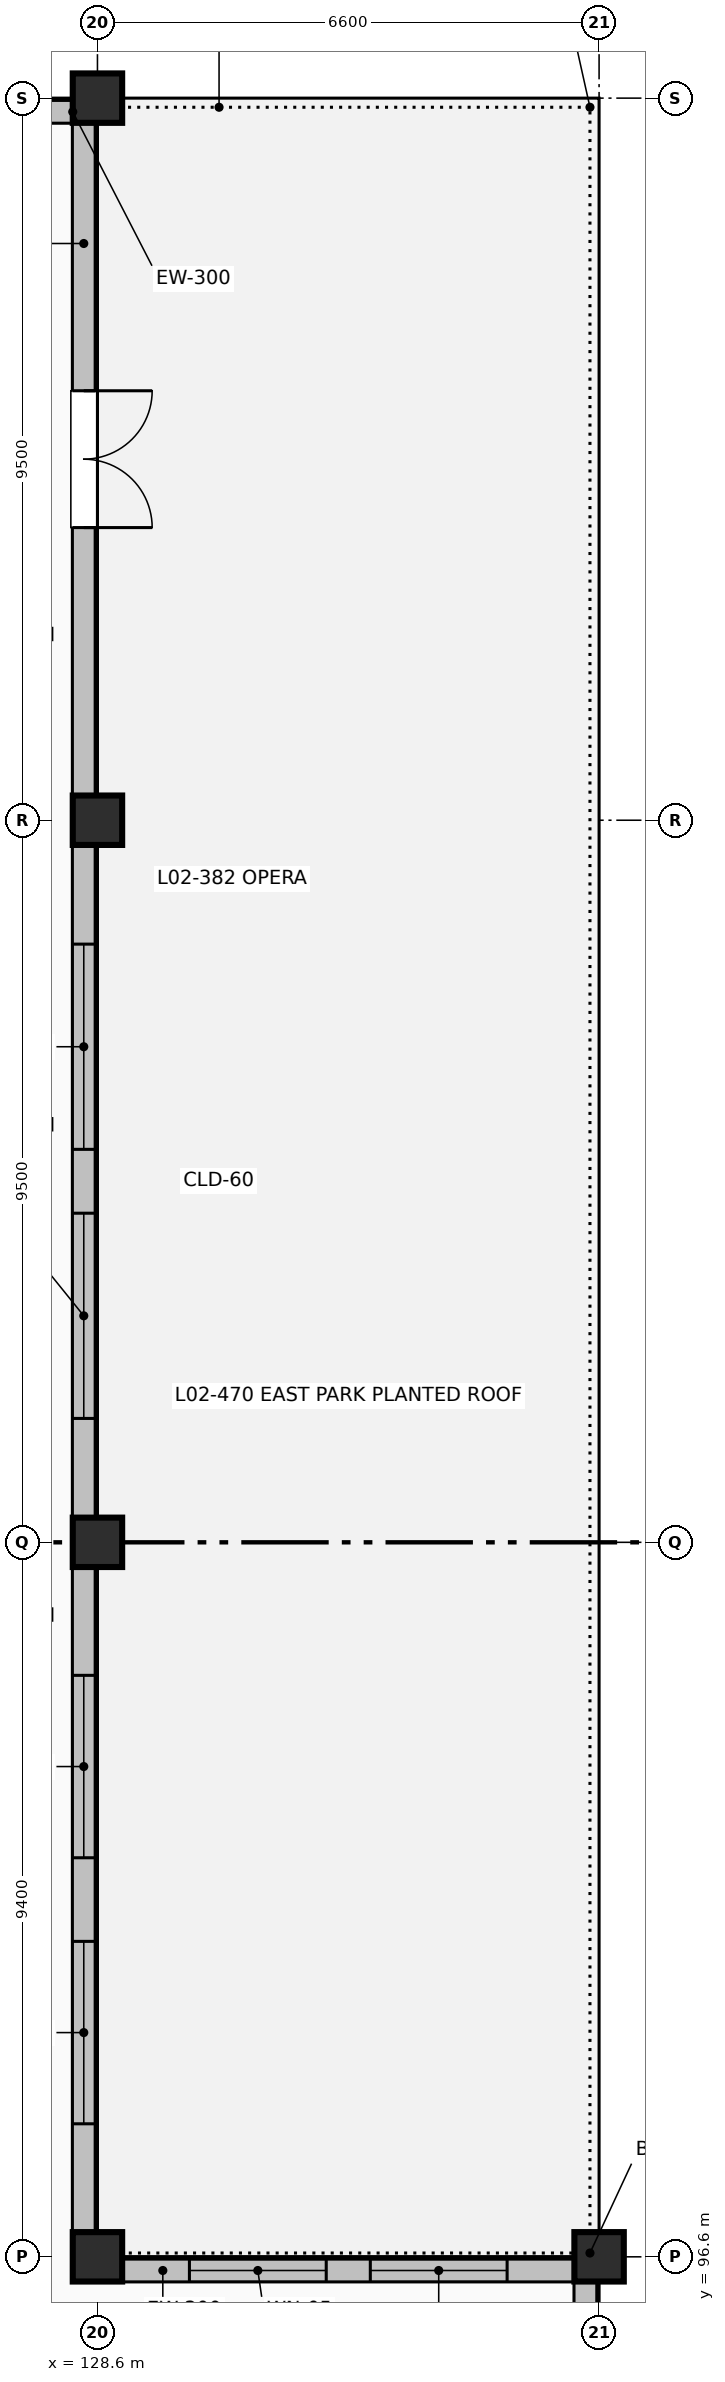
"""IFC4 building model, lengths in metres.
Left out: names, types, materials, properties, quantities, classifications, styles, units other than length and angle.
Written with IfcOpenShell. Run it as: python <this file> out.ifc"""

import sys

from ifc_helpers import new_model, si_unit, direction, frame, frame_2d, origin, origin_2d, place, context, subcontext, project, spatial, rectangle, extrude, element, fill, save


model = new_model("IFC4")
c1 = context("Model", 3, precision=1e-05, world=origin(), true_north=direction((0.0, 1.0)))
c2 = subcontext(c1, "Body", "Model", "MODEL_VIEW")
j1 = project(units=[si_unit("LENGTHUNIT", "METRE"), si_unit("PLANEANGLEUNIT", "RADIAN")], contexts=[c1])
p1 = place(None, origin())
s1 = spatial("IfcSite", under=j1, at=p1, CompositionType="ELEMENT")
p2 = place(p1, origin())
s2 = spatial("IfcBuilding", under=s1, at=p2, CompositionType="ELEMENT")
p3 = place(p2, frame((0.0, 0.0, 10.2)))
s3 = spatial("IfcBuildingStorey", under=s2, at=p3, CompositionType="ELEMENT", Elevation=10.2)
for number, where, z_axis, x_axis in (
    (1, (128.6, 96.6, 0.0), (0.0, 0.0, 1.0), (1.0, 0.0, 0.0)),
    (2, (128.6, 106.0, 0.0), (0.0, 0.0, 1.0), (1.0, 0.0, 0.0)),
    (3, (128.6, 115.5, 0.0), (0.0, 0.0, 1.0), (1.0, 0.0, 0.0)),
    (4, (128.6, 125.0, 0.0), (0.0, 0.0, 1.0), (1.0, 0.0, 0.0)),
    (5, (135.2, 96.6, 0.0), (0.0, 0.0, 1.0), (1.0, 0.0, 0.0)),
):
    element("IfcColumn", number, at=place(p3, frame(where, z_axis=z_axis, x_axis=x_axis)), inside=s3, PredefinedType="COLUMN", context=c2, shape_type="SweptSolid", body=[
        extrude(rectangle(XDim=0.65, YDim=0.65, at=origin_2d()), origin(), (0.0, 0.0, 1.0), 4.8),
    ])
p4 = place(p3, frame((135.02, 96.275, 0.0), z_axis=(0.0, 0.0, 1.0), x_axis=(0.0, -1.0, 0.0)))
e6 = element("IfcWall", 6, at=p4, inside=s3, PredefinedType="SOLIDWALL", context=c2, shape_type="SweptSolid", body=[
    extrude(rectangle(XDim=8.665, YDim=0.3, at=frame_2d((4.333, 0.0))), origin(), (0.0, 0.0, 1.0), 3.672),
])
p5 = place(p4, frame((1.7, 0.0, 0.9)))
e7 = element("IfcOpeningElement", 7, at=p5, cuts=e6, PredefinedType="OPENING", context=c2, shape_type="SweptSolid", body=[
    extrude(rectangle(XDim=1.8, YDim=2.1, at=frame_2d((0.9, 1.05))), frame((0.0, 0.16, 0.0), z_axis=(0.0, -1.0, 0.0), x_axis=(1.0, 0.0, 0.0)), (0.0, 0.0, 1.0), 0.32),
])
p6 = place(p4, frame((5.166, 0.0, 0.9)))
e8 = element("IfcOpeningElement", 8, at=p6, cuts=e6, PredefinedType="OPENING", context=c2, shape_type="SweptSolid", body=[
    extrude(rectangle(XDim=1.8, YDim=2.1, at=frame_2d((0.9, 1.05))), frame((0.0, 0.16, 0.0), z_axis=(0.0, -1.0, 0.0), x_axis=(1.0, 0.0, 0.0)), (0.0, 0.0, 1.0), 0.32),
])
p7 = place(p3, frame((122.325, 124.82, 0.0), z_axis=(0.0, 0.0, 1.0), x_axis=(1.0, 0.0, 0.0)))
e9 = element("IfcWall", 9, at=p7, inside=s3, PredefinedType="SOLIDWALL", context=c2, shape_type="SweptSolid", body=[
    extrude(rectangle(XDim=5.95, YDim=0.3, at=frame_2d((2.975, 0.0))), origin(), (0.0, 0.0, 1.0), 3.822),
])
p8 = place(p7, frame((1.975, 0.0, 1.0)))
e10 = element("IfcOpeningElement", 10, at=p8, cuts=e9, PredefinedType="OPENING", context=c2, shape_type="SweptSolid", body=[
    extrude(rectangle(XDim=2.0, YDim=1.5, at=frame_2d((1.0, 0.75))), frame((0.0, 0.16, 0.0), z_axis=(0.0, -1.0, 0.0), x_axis=(1.0, 0.0, 0.0)), (0.0, 0.0, 1.0), 0.32),
])
p9 = place(p3, frame((128.42, 124.675, 0.0), z_axis=(0.0, 0.0, 1.0), x_axis=(0.0, -1.0, 0.0)))
e11 = element("IfcWall", 11, at=p9, inside=s3, PredefinedType="SOLIDWALL", context=c2, shape_type="SweptSolid", body=[
    extrude(rectangle(XDim=8.85, YDim=0.3, at=frame_2d((4.425, 0.0))), origin(), (0.0, 0.0, 1.0), 3.672),
])
p10 = place(p9, frame((3.525, 0.0, 0.0)))
e12 = element("IfcOpeningElement", 12, at=p10, cuts=e11, PredefinedType="OPENING", context=c2, shape_type="SweptSolid", body=[
    extrude(rectangle(XDim=1.8, YDim=2.2, at=frame_2d((0.9, 1.1))), frame((0.0, 0.16, 0.0), z_axis=(0.0, -1.0, 0.0), x_axis=(1.0, 0.0, 0.0)), (0.0, 0.0, 1.0), 0.32),
])
p11 = place(p3, frame((128.42, 115.175, 0.0), z_axis=(0.0, 0.0, 1.0), x_axis=(0.0, -1.0, 0.0)))
e13 = element("IfcWall", 13, at=p11, inside=s3, PredefinedType="SOLIDWALL", context=c2, shape_type="SweptSolid", body=[
    extrude(rectangle(XDim=8.85, YDim=0.3, at=frame_2d((4.425, 0.0))), origin(), (0.0, 0.0, 1.0), 3.672),
])
p12 = place(p11, frame((1.305, 0.0, 0.9)))
e14 = element("IfcOpeningElement", 14, at=p12, cuts=e13, PredefinedType="OPENING", context=c2, shape_type="SweptSolid", body=[
    extrude(rectangle(XDim=2.7, YDim=2.1, at=frame_2d((1.35, 1.05))), frame((0.0, 0.16, 0.0), z_axis=(0.0, -1.0, 0.0), x_axis=(1.0, 0.0, 0.0)), (0.0, 0.0, 1.0), 0.32),
])
p13 = place(p11, frame((4.845, 0.0, 0.9)))
e15 = element("IfcOpeningElement", 15, at=p13, cuts=e13, PredefinedType="OPENING", context=c2, shape_type="SweptSolid", body=[
    extrude(rectangle(XDim=2.7, YDim=2.1, at=frame_2d((1.35, 1.05))), frame((0.0, 0.16, 0.0), z_axis=(0.0, -1.0, 0.0), x_axis=(1.0, 0.0, 0.0)), (0.0, 0.0, 1.0), 0.32),
])
p14 = place(p3, frame((128.42, 105.675, 0.0), z_axis=(0.0, 0.0, 1.0), x_axis=(0.0, -1.0, 0.0)))
e16 = element("IfcWall", 16, at=p14, inside=s3, PredefinedType="SOLIDWALL", context=c2, shape_type="SweptSolid", body=[
    extrude(rectangle(XDim=8.75, YDim=0.3, at=frame_2d((4.375, 0.0))), origin(), (0.0, 0.0, 1.0), 3.672),
])
p15 = place(p14, frame((1.425, 0.0, 1.0)))
e17 = element("IfcOpeningElement", 17, at=p15, cuts=e16, PredefinedType="OPENING", context=c2, shape_type="SweptSolid", body=[
    extrude(rectangle(XDim=2.4, YDim=1.7, at=frame_2d((1.2, 0.85))), frame((0.0, 0.16, 0.0), z_axis=(0.0, -1.0, 0.0), x_axis=(1.0, 0.0, 0.0)), (0.0, 0.0, 1.0), 0.32),
])
p16 = place(p14, frame((4.925, 0.0, 1.0)))
e18 = element("IfcOpeningElement", 18, at=p16, cuts=e16, PredefinedType="OPENING", context=c2, shape_type="SweptSolid", body=[
    extrude(rectangle(XDim=2.4, YDim=1.7, at=frame_2d((1.2, 0.85))), frame((0.0, 0.16, 0.0), z_axis=(0.0, -1.0, 0.0), x_axis=(1.0, 0.0, 0.0)), (0.0, 0.0, 1.0), 0.32),
])
p17 = place(p3, frame((128.925, 96.42, 0.0), z_axis=(0.0, 0.0, 1.0), x_axis=(1.0, 0.0, 0.0)))
e19 = element("IfcWall", 19, at=p17, inside=s3, PredefinedType="SOLIDWALL", context=c2, shape_type="SweptSolid", body=[
    extrude(rectangle(XDim=5.95, YDim=0.3, at=frame_2d((2.975, 0.0))), origin(), (0.0, 0.0, 1.0), 3.872),
])
p18 = place(p17, frame((0.885, 0.0, 0.9)))
e20 = element("IfcOpeningElement", 20, at=p18, cuts=e19, PredefinedType="OPENING", context=c2, shape_type="SweptSolid", body=[
    extrude(rectangle(XDim=1.8, YDim=2.1, at=frame_2d((0.9, 1.05))), frame((0.0, 0.16, 0.0), z_axis=(0.0, -1.0, 0.0), x_axis=(1.0, 0.0, 0.0)), (0.0, 0.0, 1.0), 0.32),
])
p19 = place(p17, frame((3.265, 0.0, 0.9)))
e21 = element("IfcOpeningElement", 21, at=p19, cuts=e19, PredefinedType="OPENING", context=c2, shape_type="SweptSolid", body=[
    extrude(rectangle(XDim=1.8, YDim=2.1, at=frame_2d((0.9, 1.05))), frame((0.0, 0.16, 0.0), z_axis=(0.0, -1.0, 0.0), x_axis=(1.0, 0.0, 0.0)), (0.0, 0.0, 1.0), 0.32),
])
p20 = place(p10, origin())
e22 = element("IfcDoor", 22, at=p20, inside=s3, OperationType="DOUBLE_DOOR_SINGLE_SWING", PredefinedType="DOOR", context=c2, shape_type="SweptSolid", body=[
    extrude(rectangle(XDim=1.8, YDim=2.2, at=frame_2d((0.9, 1.1))), frame((0.0, 0.025, 0.0), z_axis=(0.0, -1.0, 0.0), x_axis=(1.0, 0.0, 0.0)), (0.0, 0.0, 1.0), 0.05),
])
fill(e12, e22)
p21 = place(p12, origin())
e23 = element("IfcWindow", 23, at=p21, inside=s3, PartitioningType="SINGLE_PANEL", PredefinedType="WINDOW", context=c2, shape_type="SweptSolid", body=[
    extrude(rectangle(XDim=2.7, YDim=2.1, at=frame_2d((1.35, 1.05))), frame((0.0, 0.03, 0.0), z_axis=(0.0, -1.0, 0.0), x_axis=(1.0, 0.0, 0.0)), (0.0, 0.0, 1.0), 0.06),
])
fill(e14, e23)
p22 = place(p13, origin())
e24 = element("IfcWindow", 24, at=p22, inside=s3, PartitioningType="SINGLE_PANEL", PredefinedType="WINDOW", context=c2, shape_type="SweptSolid", body=[
    extrude(rectangle(XDim=2.7, YDim=2.1, at=frame_2d((1.35, 1.05))), frame((0.0, 0.03, 0.0), z_axis=(0.0, -1.0, 0.0), x_axis=(1.0, 0.0, 0.0)), (0.0, 0.0, 1.0), 0.06),
])
fill(e15, e24)
p23 = place(p15, origin())
e25 = element("IfcWindow", 25, at=p23, inside=s3, PartitioningType="SINGLE_PANEL", PredefinedType="WINDOW", context=c2, shape_type="SweptSolid", body=[
    extrude(rectangle(XDim=2.4, YDim=1.7, at=frame_2d((1.2, 0.85))), frame((0.0, 0.03, 0.0), z_axis=(0.0, -1.0, 0.0), x_axis=(1.0, 0.0, 0.0)), (0.0, 0.0, 1.0), 0.06),
])
fill(e17, e25)
p24 = place(p16, origin())
e26 = element("IfcWindow", 26, at=p24, inside=s3, PartitioningType="SINGLE_PANEL", PredefinedType="WINDOW", context=c2, shape_type="SweptSolid", body=[
    extrude(rectangle(XDim=2.4, YDim=1.7, at=frame_2d((1.2, 0.85))), frame((0.0, 0.03, 0.0), z_axis=(0.0, -1.0, 0.0), x_axis=(1.0, 0.0, 0.0)), (0.0, 0.0, 1.0), 0.06),
])
fill(e18, e26)
p25 = place(p18, origin())
e27 = element("IfcWindow", 27, at=p25, inside=s3, PartitioningType="SINGLE_PANEL", PredefinedType="WINDOW", context=c2, shape_type="SweptSolid", body=[
    extrude(rectangle(XDim=1.8, YDim=2.1, at=frame_2d((0.9, 1.05))), frame((0.0, 0.03, 0.0), z_axis=(0.0, -1.0, 0.0), x_axis=(1.0, 0.0, 0.0)), (0.0, 0.0, 1.0), 0.06),
])
fill(e20, e27)
p26 = place(p19, origin())
e28 = element("IfcWindow", 28, at=p26, inside=s3, PartitioningType="SINGLE_PANEL", PredefinedType="WINDOW", context=c2, shape_type="SweptSolid", body=[
    extrude(rectangle(XDim=1.8, YDim=2.1, at=frame_2d((0.9, 1.05))), frame((0.0, 0.03, 0.0), z_axis=(0.0, -1.0, 0.0), x_axis=(1.0, 0.0, 0.0)), (0.0, 0.0, 1.0), 0.06),
])
fill(e21, e28)
save(model, sys.argv[1])
